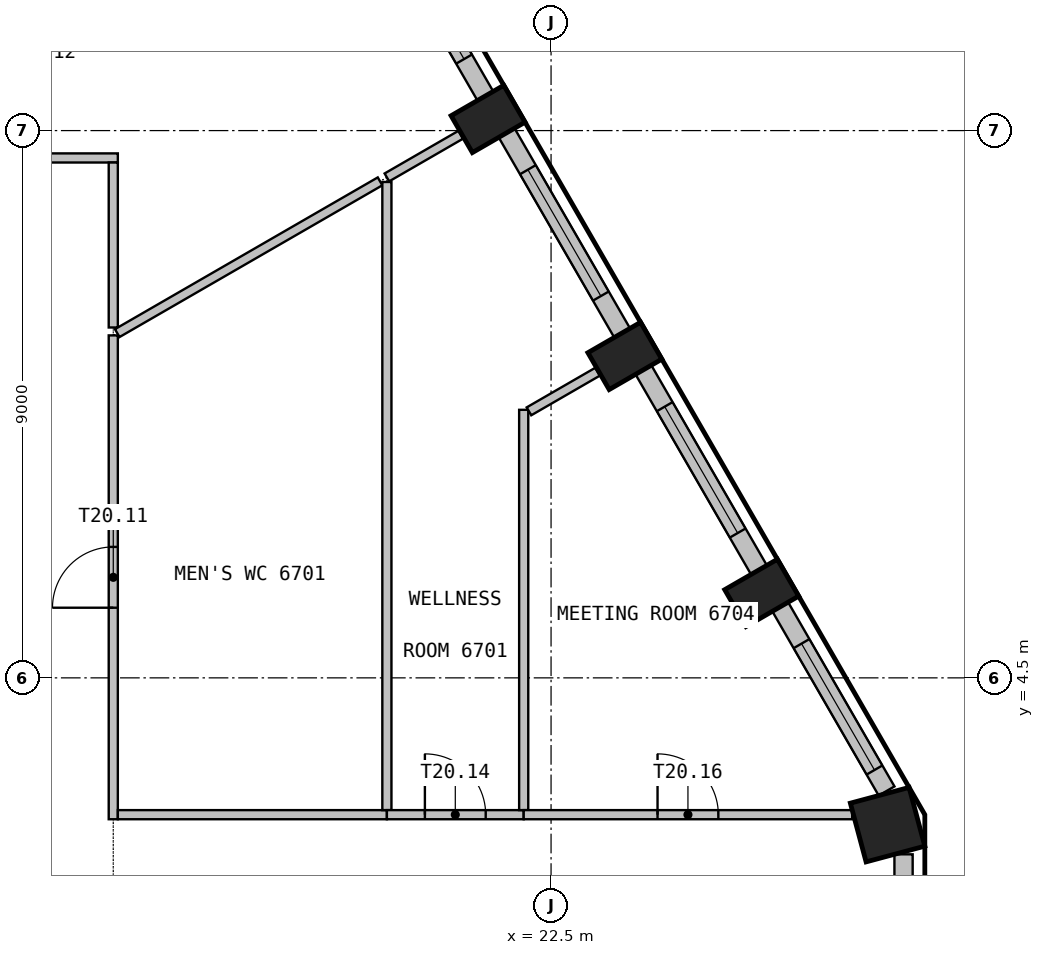
"""IFC4 building model, lengths in metres.
Left out: names, types, materials, properties, quantities, classifications, styles, units other than length and angle.
Written with IfcOpenShell. Run it as: python <this file> out.ifc"""

import sys

from ifc_helpers import new_model, si_unit, direction, frame, frame_2d, origin, origin_2d, place, context, subcontext, project, spatial, rectangle, extrude, element, fill, save


model = new_model("IFC4")
c1 = context("Model", 3, precision=1e-05, world=origin(), true_north=direction((0.0, 1.0)))
c2 = subcontext(c1, "Body", "Model", "MODEL_VIEW")
j1 = project(units=[si_unit("LENGTHUNIT", "METRE"), si_unit("PLANEANGLEUNIT", "RADIAN")], contexts=[c1])
p1 = place(None, origin())
s1 = spatial("IfcSite", under=j1, at=p1, CompositionType="ELEMENT")
p2 = place(p1, origin())
s2 = spatial("IfcBuilding", under=s1, at=p2, CompositionType="ELEMENT")
p3 = place(p2, frame((0.0, 0.0, 270.3)))
s3 = spatial("IfcBuildingStorey", under=s2, at=p3, CompositionType="ELEMENT", Elevation=270.3)
p4 = place(p3, frame((28.035, 2.086, 0.0), z_axis=(0.0, 0.0, 1.0), x_axis=(-0.258819045103, 0.965925826289, 0.0)))
e1 = element("IfcColumn", 1, at=p4, inside=s3, PredefinedType="COLUMN", context=c2, shape_type="SweptSolid", body=[
    extrude(rectangle(XDim=1.0, YDim=1.0, at=origin_2d()), origin(), (0.0, 0.0, 1.0), 3.575),
])
for number, where, z_axis, x_axis in (
    (2, (25.964, 5.897, 0.0), (0.0, 0.0, 1.0), (-0.5, 0.866, 0.0)),
    (3, (23.714, 9.794, 0.0), (0.0, 0.0, 1.0), (-0.5, 0.866, 0.0)),
    (4, (21.464, 13.691, 0.0), (0.0, 0.0, 1.0), (-0.5, 0.866, 0.0)),
):
    element("IfcColumn", number, at=place(p3, frame(where, z_axis=z_axis, x_axis=x_axis)), inside=s3, PredefinedType="COLUMN", context=c2, shape_type="SweptSolid", body=[
        extrude(rectangle(XDim=0.7, YDim=1.0, at=origin_2d()), origin(), (0.0, 0.0, 1.0), 3.575),
    ])
p5 = place(p3, frame((28.297, -1.598, 0.0), z_axis=(0.0, 0.0, 1.0), x_axis=(0.0, 1.0, 0.0)))
e5 = element("IfcWall", 5, at=p5, inside=s3, PredefinedType="SOLIDWALL", context=c2, shape_type="SweptSolid", body=[
    extrude(rectangle(XDim=3.196, YDim=0.3, at=frame_2d((1.598, 0.0))), origin(), (0.0, 0.0, 1.0), 3.575),
])
p6 = place(p5, frame((0.398, 0.0, 0.9)))
e6 = element("IfcOpeningElement", 6, at=p6, cuts=e5, PredefinedType="OPENING", context=c2, shape_type="SweptSolid", body=[
    extrude(rectangle(XDim=2.4, YDim=2.1, at=frame_2d((1.2, 1.05))), frame((0.0, 0.16, 0.0), z_axis=(0.0, -1.0, 0.0), x_axis=(1.0, 0.0, 0.0)), (0.0, 0.0, 1.0), 0.32),
])
p7 = place(p3, frame((28.018, 2.64, 0.0), z_axis=(0.0, 0.0, 1.0), x_axis=(-0.499990325971, 0.866030989016, 0.0)))
e7 = element("IfcWall", 7, at=p7, inside=s3, PredefinedType="SOLIDWALL", context=c2, shape_type="SweptSolid", body=[
    extrude(rectangle(XDim=3.498, YDim=0.3, at=frame_2d((1.749, 0.0))), origin(), (0.0, 0.0, 1.0), 3.575),
])
p8 = place(p7, frame((0.398, 0.0, 0.9)))
e8 = element("IfcOpeningElement", 8, at=p8, cuts=e7, PredefinedType="OPENING", context=c2, shape_type="SweptSolid", body=[
    extrude(rectangle(XDim=2.4, YDim=2.1, at=frame_2d((1.2, 1.05))), frame((0.0, 0.16, 0.0), z_axis=(0.0, -1.0, 0.0), x_axis=(1.0, 0.0, 0.0)), (0.0, 0.0, 1.0), 0.32),
])
p9 = place(p3, frame((25.919, 6.276, 0.0), z_axis=(0.0, 0.0, 1.0), x_axis=(-0.499982058975, 0.866035761792, 0.0)))
e9 = element("IfcWall", 9, at=p9, inside=s3, PredefinedType="SOLIDWALL", context=c2, shape_type="SweptSolid", body=[
    extrude(rectangle(XDim=3.799, YDim=0.3, at=frame_2d((1.899, 0.0))), origin(), (0.0, 0.0, 1.0), 3.575),
])
p10 = place(p9, frame((0.699, 0.0, 0.9)))
e10 = element("IfcOpeningElement", 10, at=p10, cuts=e9, PredefinedType="OPENING", context=c2, shape_type="SweptSolid", body=[
    extrude(rectangle(XDim=2.4, YDim=2.1, at=frame_2d((1.2, 1.05))), frame((0.0, 0.16, 0.0), z_axis=(0.0, -1.0, 0.0), x_axis=(1.0, 0.0, 0.0)), (0.0, 0.0, 1.0), 0.32),
])
p11 = place(p3, frame((23.669, 10.173, 0.0), z_axis=(0.0, 0.0, 1.0), x_axis=(-0.499982058975, 0.866035761792, 0.0)))
e11 = element("IfcWall", 11, at=p11, inside=s3, PredefinedType="SOLIDWALL", context=c2, shape_type="SweptSolid", body=[
    extrude(rectangle(XDim=3.799, YDim=0.3, at=frame_2d((1.899, 0.0))), origin(), (0.0, 0.0, 1.0), 3.575),
])
p12 = place(p11, frame((0.699, 0.0, 0.9)))
e12 = element("IfcOpeningElement", 12, at=p12, cuts=e11, PredefinedType="OPENING", context=c2, shape_type="SweptSolid", body=[
    extrude(rectangle(XDim=2.4, YDim=2.1, at=frame_2d((1.2, 1.05))), frame((0.0, 0.16, 0.0), z_axis=(0.0, -1.0, 0.0), x_axis=(1.0, 0.0, 0.0)), (0.0, 0.0, 1.0), 0.32),
])
p13 = place(p3, frame((21.419, 14.07, 0.0), z_axis=(0.0, 0.0, 1.0), x_axis=(-0.499960102815, 0.866048437209, 0.0)))
e13 = element("IfcWall", 13, at=p13, inside=s3, PredefinedType="SOLIDWALL", context=c2, shape_type="SweptSolid", body=[
    extrude(rectangle(XDim=3.498, YDim=0.3, at=frame_2d((1.749, 0.0))), origin(), (0.0, 0.0, 1.0), 3.575),
])
p14 = place(p13, frame((0.699, 0.0, 0.9)))
e14 = element("IfcOpeningElement", 14, at=p14, cuts=e13, PredefinedType="OPENING", context=c2, shape_type="SweptSolid", body=[
    extrude(rectangle(XDim=2.4, YDim=2.1, at=frame_2d((1.2, 1.05))), frame((0.0, 0.16, 0.0), z_axis=(0.0, -1.0, 0.0), x_axis=(1.0, 0.0, 0.0)), (0.0, 0.0, 1.0), 0.32),
])
p15 = place(p3, frame((15.375, 13.05, 0.0), z_axis=(0.0, 0.0, 1.0), x_axis=(-1.0, 0.0, 0.0)))
e15 = element("IfcWall", 15, at=p15, inside=s3, PredefinedType="PARTITIONING", context=c2, shape_type="SweptSolid", body=[
    extrude(rectangle(XDim=8.625, YDim=0.15, at=frame_2d((4.312, 0.0))), origin(), (0.0, 0.0, 1.0), 3.575),
])
p16 = place(p15, frame((3.812, 0.0, 0.0)))
e16 = element("IfcOpeningElement", 16, at=p16, cuts=e15, PredefinedType="OPENING", context=c2, shape_type="SweptSolid", body=[
    extrude(rectangle(XDim=1.0, YDim=2.1, at=frame_2d((0.5, 1.05))), frame((0.0, 0.085, 0.0), z_axis=(0.0, -1.0, 0.0), x_axis=(1.0, 0.0, 0.0)), (0.0, 0.0, 1.0), 0.17),
])
p17 = place(p3, frame((15.3, 2.175, 0.0), z_axis=(0.0, 0.0, 1.0), x_axis=(0.0, 1.0, 0.0)))
e17 = element("IfcWall", 17, at=p17, inside=s3, PredefinedType="PARTITIONING", context=c2, shape_type="SweptSolid", body=[
    extrude(rectangle(XDim=7.957, YDim=0.15, at=frame_2d((3.979, 0.0))), origin(), (0.0, 0.0, 1.0), 3.575),
])
p18 = place(p17, frame((3.479, 0.0, 0.0)))
e18 = element("IfcOpeningElement", 18, at=p18, cuts=e17, PredefinedType="OPENING", context=c2, shape_type="SweptSolid", body=[
    extrude(rectangle(XDim=1.0, YDim=2.1, at=frame_2d((0.5, 1.05))), frame((0.0, 0.085, 0.0), z_axis=(0.0, -1.0, 0.0), x_axis=(1.0, 0.0, 0.0)), (0.0, 0.0, 1.0), 0.17),
])
p19 = place(p3, frame((15.375, 2.25, 0.0), z_axis=(0.0, 0.0, 1.0), x_axis=(1.0, 0.0, 0.0)))
e19 = element("IfcWall", 19, at=p19, inside=s3, PredefinedType="PARTITIONING", context=c2, shape_type="SweptSolid", body=[
    extrude(rectangle(XDim=4.425, YDim=0.15, at=frame_2d((2.212, 0.0))), origin(), (0.0, 0.0, 1.0), 3.575),
])
p20 = place(p3, frame((15.3, 10.262, 0.0), z_axis=(0.0, 0.0, 1.0), x_axis=(0.0, 1.0, 0.0)))
e20 = element("IfcWall", 20, at=p20, inside=s3, PredefinedType="PARTITIONING", context=c2, shape_type="SweptSolid", body=[
    extrude(rectangle(XDim=2.713, YDim=0.15, at=frame_2d((1.356, 0.0))), origin(), (0.0, 0.0, 1.0), 3.575),
])
p21 = place(p3, frame((19.688, 12.665, 0.0), z_axis=(0.0, 0.0, 1.0), x_axis=(-0.866025118187, -0.500000494669, 0.0)))
e21 = element("IfcWall", 21, at=p21, inside=s3, PredefinedType="PARTITIONING", context=c2, shape_type="SweptSolid", body=[
    extrude(rectangle(XDim=4.991, YDim=0.15, at=frame_2d((2.496, 0.0))), origin(), (0.0, 0.0, 1.0), 3.575),
])
p22 = place(p3, frame((19.8, 12.655, 0.0), z_axis=(0.0, 0.0, 1.0), x_axis=(0.0, -1.0, 0.0)))
e22 = element("IfcWall", 22, at=p22, inside=s3, PredefinedType="PARTITIONING", context=c2, shape_type="SweptSolid", body=[
    extrude(rectangle(XDim=10.33, YDim=0.15, at=frame_2d((5.165, 0.0))), origin(), (0.0, 0.0, 1.0), 3.575),
])
p23 = place(p3, frame((19.8, 2.25, 0.0), z_axis=(0.0, 0.0, 1.0), x_axis=(1.0, 0.0, 0.0)))
e23 = element("IfcWall", 23, at=p23, inside=s3, PredefinedType="PARTITIONING", context=c2, shape_type="SweptSolid", body=[
    extrude(rectangle(XDim=2.25, YDim=0.15, at=frame_2d((1.125, 0.0))), origin(), (0.0, 0.0, 1.0), 3.575),
])
p24 = place(p23, frame((0.625, 0.0, 0.0)))
e24 = element("IfcOpeningElement", 24, at=p24, cuts=e23, PredefinedType="OPENING", context=c2, shape_type="SweptSolid", body=[
    extrude(rectangle(XDim=1.0, YDim=2.1, at=frame_2d((0.5, 1.05))), frame((0.0, 0.085, 0.0), z_axis=(0.0, -1.0, 0.0), x_axis=(1.0, 0.0, 0.0)), (0.0, 0.0, 1.0), 0.17),
])
p25 = place(p3, frame((21.014, 13.431, 0.0), z_axis=(0.0, 0.0, 1.0), x_axis=(-0.865918715181, -0.500184744569, 0.0)))
e25 = element("IfcWall", 25, at=p25, inside=s3, PredefinedType="PARTITIONING", context=c2, shape_type="SweptSolid", body=[
    extrude(rectangle(XDim=1.402, YDim=0.15, at=frame_2d((0.701, 0.0))), origin(), (0.0, 0.0, 1.0), 3.575),
])
p26 = place(p3, frame((22.05, 8.908, 0.0), z_axis=(0.0, 0.0, 1.0), x_axis=(0.0, -1.0, 0.0)))
e26 = element("IfcWall", 26, at=p26, inside=s3, PredefinedType="PARTITIONING", context=c2, shape_type="SweptSolid", body=[
    extrude(rectangle(XDim=6.583, YDim=0.15, at=frame_2d((3.292, 0.0))), origin(), (0.0, 0.0, 1.0), 3.575),
])
p27 = place(p3, frame((22.05, 2.25, 0.0), z_axis=(0.0, 0.0, 1.0), x_axis=(1.0, 0.0, 0.0)))
e27 = element("IfcWall", 27, at=p27, inside=s3, PredefinedType="PARTITIONING", context=c2, shape_type="SweptSolid", body=[
    extrude(rectangle(XDim=5.402, YDim=0.15, at=frame_2d((2.701, 0.0))), origin(), (0.0, 0.0, 1.0), 3.575),
])
p28 = place(p27, frame((2.201, 0.0, 0.0)))
e28 = element("IfcOpeningElement", 28, at=p28, cuts=e27, PredefinedType="OPENING", context=c2, shape_type="SweptSolid", body=[
    extrude(rectangle(XDim=1.0, YDim=2.1, at=frame_2d((0.5, 1.05))), frame((0.0, 0.085, 0.0), z_axis=(0.0, -1.0, 0.0), x_axis=(1.0, 0.0, 0.0)), (0.0, 0.0, 1.0), 0.17),
])
p29 = place(p3, frame((23.264, 9.534, 0.0), z_axis=(0.0, 0.0, 1.0), x_axis=(-0.865960725898, -0.500112008656, 0.0)))
e29 = element("IfcWall", 29, at=p29, inside=s3, PredefinedType="PARTITIONING", context=c2, shape_type="SweptSolid", body=[
    extrude(rectangle(XDim=1.302, YDim=0.15, at=frame_2d((0.651, 0.0))), origin(), (0.0, 0.0, 1.0), 3.575),
])
p30 = place(p8, origin())
e30 = element("IfcWindow", 30, at=p30, inside=s3, PartitioningType="SINGLE_PANEL", PredefinedType="WINDOW", context=c2, shape_type="SweptSolid", body=[
    extrude(rectangle(XDim=2.4, YDim=2.1, at=frame_2d((1.2, 1.05))), frame((0.0, 0.03, 0.0), z_axis=(0.0, -1.0, 0.0), x_axis=(1.0, 0.0, 0.0)), (0.0, 0.0, 1.0), 0.06),
])
fill(e8, e30)
p31 = place(p10, origin())
e31 = element("IfcWindow", 31, at=p31, inside=s3, PartitioningType="SINGLE_PANEL", PredefinedType="WINDOW", context=c2, shape_type="SweptSolid", body=[
    extrude(rectangle(XDim=2.4, YDim=2.1, at=frame_2d((1.2, 1.05))), frame((0.0, 0.03, 0.0), z_axis=(0.0, -1.0, 0.0), x_axis=(1.0, 0.0, 0.0)), (0.0, 0.0, 1.0), 0.06),
])
fill(e10, e31)
p32 = place(p12, origin())
e32 = element("IfcWindow", 32, at=p32, inside=s3, PartitioningType="SINGLE_PANEL", PredefinedType="WINDOW", context=c2, shape_type="SweptSolid", body=[
    extrude(rectangle(XDim=2.4, YDim=2.1, at=frame_2d((1.2, 1.05))), frame((0.0, 0.03, 0.0), z_axis=(0.0, -1.0, 0.0), x_axis=(1.0, 0.0, 0.0)), (0.0, 0.0, 1.0), 0.06),
])
fill(e12, e32)
p33 = place(p14, origin())
e33 = element("IfcWindow", 33, at=p33, inside=s3, PartitioningType="SINGLE_PANEL", PredefinedType="WINDOW", context=c2, shape_type="SweptSolid", body=[
    extrude(rectangle(XDim=2.4, YDim=2.1, at=frame_2d((1.2, 1.05))), frame((0.0, 0.03, 0.0), z_axis=(0.0, -1.0, 0.0), x_axis=(1.0, 0.0, 0.0)), (0.0, 0.0, 1.0), 0.06),
])
fill(e14, e33)
p34 = place(p18, origin())
e34 = element("IfcDoor", 34, at=p34, inside=s3, OperationType="SINGLE_SWING_RIGHT", PredefinedType="DOOR", context=c2, shape_type="SweptSolid", body=[
    extrude(rectangle(XDim=1.0, YDim=2.1, at=frame_2d((0.5, 1.05))), frame((0.0, 0.025, 0.0), z_axis=(0.0, -1.0, 0.0), x_axis=(1.0, 0.0, 0.0)), (0.0, 0.0, 1.0), 0.05),
])
fill(e18, e34)
p35 = place(p24, origin())
e35 = element("IfcDoor", 35, at=p35, inside=s3, OperationType="SINGLE_SWING_LEFT", PredefinedType="DOOR", context=c2, shape_type="SweptSolid", body=[
    extrude(rectangle(XDim=1.0, YDim=2.1, at=frame_2d((0.5, 1.05))), frame((0.0, 0.025, 0.0), z_axis=(0.0, -1.0, 0.0), x_axis=(1.0, 0.0, 0.0)), (0.0, 0.0, 1.0), 0.05),
])
fill(e24, e35)
p36 = place(p28, origin())
e36 = element("IfcDoor", 36, at=p36, inside=s3, OperationType="SINGLE_SWING_RIGHT", PredefinedType="DOOR", context=c2, shape_type="SweptSolid", body=[
    extrude(rectangle(XDim=1.0, YDim=2.1, at=frame_2d((0.5, 1.05))), frame((0.0, 0.025, 0.0), z_axis=(0.0, -1.0, 0.0), x_axis=(1.0, 0.0, 0.0)), (0.0, 0.0, 1.0), 0.05),
])
fill(e28, e36)
save(model, sys.argv[1])
